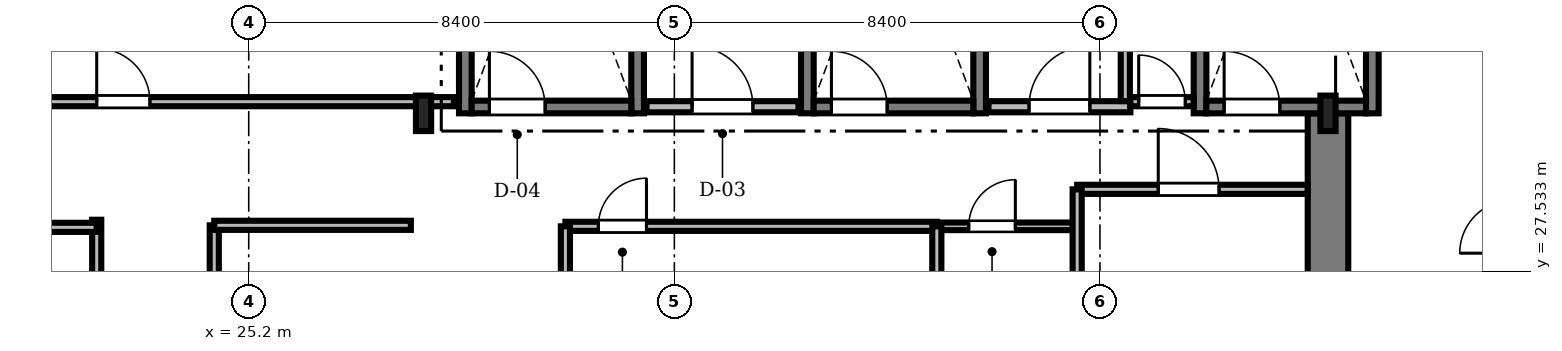
"""IFC4 building model, lengths in metres.
Left out: names, types, materials, properties, quantities, classifications, styles, units other than length and angle.
Written with IfcOpenShell. Run it as: python <this file> out.ifc"""

import sys

from ifc_helpers import new_model, si_unit, direction, frame, frame_2d, origin, origin_2d, place, context, subcontext, project, spatial, rectangle, i_section, extrude, source, transform, mapped, element, fill, save


model = new_model("IFC4")
c1 = context("Model", 3, precision=1e-05, world=origin(), true_north=direction((0.0, 1.0)))
c2 = subcontext(c1, "Body", "Model", "MODEL_VIEW")
j1 = project(units=[si_unit("LENGTHUNIT", "METRE"), si_unit("PLANEANGLEUNIT", "RADIAN")], contexts=[c1])
p1 = place(None, origin())
s1 = spatial("IfcSite", under=j1, at=p1, CompositionType="ELEMENT")
p2 = place(p1, origin())
s2 = spatial("IfcBuilding", under=s1, at=p2, CompositionType="ELEMENT")
p3 = place(p2, frame((0.0, 0.0, 188.55)))
s3 = spatial("IfcBuildingStorey", under=s2, at=p3, CompositionType="ELEMENT", Elevation=188.55)
m1 = source(origin(), c2, "Body", "SweptSolid", [
    extrude(rectangle(XDim=13.15, YDim=0.8, at=frame_2d((6.575, 0.0))), origin(), (0.0, 0.0, 1.0), 3.53),
])
p4 = place(p3, frame((46.5, 17.5, 0.0), z_axis=(0.0, 0.0, 1.0), x_axis=(0.0, 1.0, 0.0)))
e1 = element("IfcWall", 1, at=p4, inside=s3, PredefinedType="SHEAR", context=c2, shape_type="MappedRepresentation", body=[
    mapped(m1, transform((0.0, 0.0, 0.0), scale=1.0)),
])
m2 = source(origin(), c2, "Body", "SweptSolid", [
    extrude(i_section(OverallWidth=0.3, OverallDepth=0.7, WebThickness=0.017, FlangeThickness=0.032, FilletRadius=0.027, at=origin_2d()), origin(), (0.0, 0.0, 1.0), 3.53),
])
for number, where, z_axis, x_axis in (
    (2, (28.65, 30.65, 0.0), (0.0, 0.0, 1.0), (1.0, 0.0, 0.0)),
    (3, (46.5, 30.65, 0.0), (0.0, 0.0, 1.0), (1.0, 0.0, 0.0)),
):
    element("IfcColumn", number, at=place(p3, frame(where, z_axis=z_axis, x_axis=x_axis)), inside=s3, PredefinedType="COLUMN", context=c2, shape_type="MappedRepresentation", body=[
        mapped(m2, transform((0.0, 0.0, 0.0), scale=1.0)),
    ])
m3 = source(origin(), c2, "Body", "SweptSolid", [
    extrude(rectangle(XDim=9.25, YDim=0.25, at=frame_2d((4.625, 0.0))), origin(), (0.0, 0.0, 1.0), 3.55),
])
for number, where, z_axis, x_axis in (
    (4, (29.475, 30.65, 0.0), (0.0, 0.0, 1.0), (0.0, 1.0, 0.0)),
    (5, (32.875, 30.65, 0.0), (0.0, 0.0, 1.0), (0.0, 1.0, 0.0)),
):
    element("IfcWall", number, at=place(p3, frame(where, z_axis=z_axis, x_axis=x_axis)), inside=s3, PredefinedType="SOLIDWALL", context=c2, shape_type="MappedRepresentation", body=[
        mapped(m3, transform((0.0, 0.0, 0.0), scale=1.0)),
    ])
m4 = source(origin(), c2, "Body", "SweptSolid", [
    extrude(rectangle(XDim=3.15, YDim=0.25, at=frame_2d((1.575, 0.0))), origin(), (0.0, 0.0, 1.0), 3.55),
])
p5 = place(p3, frame((29.6, 30.775, 0.0), z_axis=(0.0, 0.0, 1.0), x_axis=(1.0, 0.0, 0.0)))
e6 = element("IfcWall", 6, at=p5, inside=s3, PredefinedType="SOLIDWALL", context=c2, shape_type="MappedRepresentation", body=[
    mapped(m4, transform((0.0, 0.0, 0.0), scale=1.0)),
])
m5 = source(origin(), c2, "Body", "SweptSolid", [
    extrude(rectangle(XDim=1.1, YDim=2.2, at=frame_2d((0.55, 1.1))), frame((0.0, 0.135, 0.0), z_axis=(0.0, -1.0, 0.0), x_axis=(1.0, 0.0, 0.0)), (0.0, 0.0, 1.0), 0.27),
])
p6 = place(p5, frame((0.35, 0.0, 0.0)))
e7 = element("IfcOpeningElement", 7, at=p6, cuts=e6, PredefinedType="OPENING", context=c2, shape_type="MappedRepresentation", body=[
    mapped(m5, transform((0.0, 0.0, 0.0), scale=1.0)),
])
for number, where, z_axis, x_axis in (
    (8, (36.225, 30.65, 0.0), (0.0, 0.0, 1.0), (0.0, 1.0, 0.0)),
    (9, (39.625, 30.65, 0.0), (0.0, 0.0, 1.0), (0.0, 1.0, 0.0)),
):
    element("IfcWall", number, at=place(p3, frame(where, z_axis=z_axis, x_axis=x_axis)), inside=s3, PredefinedType="SOLIDWALL", context=c2, shape_type="MappedRepresentation", body=[
        mapped(m3, transform((0.0, 0.0, 0.0), scale=1.0)),
    ])
p7 = place(p3, frame((36.35, 30.775, 0.0), z_axis=(0.0, 0.0, 1.0), x_axis=(1.0, 0.0, 0.0)))
e10 = element("IfcWall", 10, at=p7, inside=s3, PredefinedType="SOLIDWALL", context=c2, shape_type="MappedRepresentation", body=[
    mapped(m4, transform((0.0, 0.0, 0.0), scale=1.0)),
])
p8 = place(p7, frame((0.35, 0.0, 0.0)))
e11 = element("IfcOpeningElement", 11, at=p8, cuts=e10, PredefinedType="OPENING", context=c2, shape_type="MappedRepresentation", body=[
    mapped(m5, transform((0.0, 0.0, 0.0), scale=1.0)),
])
for number, where, z_axis, x_axis in (
    (12, (43.975, 30.65, 0.0), (0.0, 0.0, 1.0), (0.0, 1.0, 0.0)),
    (13, (47.375, 30.65, 0.0), (0.0, 0.0, 1.0), (0.0, 1.0, 0.0)),
):
    element("IfcWall", number, at=place(p3, frame(where, z_axis=z_axis, x_axis=x_axis)), inside=s3, PredefinedType="SOLIDWALL", context=c2, shape_type="MappedRepresentation", body=[
        mapped(m3, transform((0.0, 0.0, 0.0), scale=1.0)),
    ])
p9 = place(p3, frame((44.1, 30.775, 0.0), z_axis=(0.0, 0.0, 1.0), x_axis=(1.0, 0.0, 0.0)))
e14 = element("IfcWall", 14, at=p9, inside=s3, PredefinedType="SOLIDWALL", context=c2, shape_type="MappedRepresentation", body=[
    mapped(m4, transform((0.0, 0.0, 0.0), scale=1.0)),
])
p10 = place(p9, frame((0.35, 0.0, 0.0)))
e15 = element("IfcOpeningElement", 15, at=p10, cuts=e14, PredefinedType="OPENING", context=c2, shape_type="MappedRepresentation", body=[
    mapped(m5, transform((0.0, 0.0, 0.0), scale=1.0)),
])
m6 = source(origin(), c2, "Body", "SweptSolid", [
    extrude(rectangle(XDim=3.0, YDim=0.22, at=frame_2d((1.5, 0.0))), origin(), (0.0, 0.0, 1.0), 3.53),
])
p11 = place(p3, frame((33.05, 30.78, 0.0), z_axis=(0.0, 0.0, 1.0), x_axis=(1.0, 0.0, 0.0)))
e16 = element("IfcWall", 16, at=p11, inside=s3, PredefinedType="SOLIDWALL", context=c2, shape_type="MappedRepresentation", body=[
    mapped(m6, transform((0.0, 0.0, 0.0), scale=1.0)),
])
m7 = source(origin(), c2, "Body", "SweptSolid", [
    extrude(rectangle(XDim=1.2, YDim=2.2, at=frame_2d((0.6, 1.1))), frame((0.0, 0.12, 0.0), z_axis=(0.0, -1.0, 0.0), x_axis=(1.0, 0.0, 0.0)), (0.0, 0.0, 1.0), 0.24),
])
p12 = place(p11, frame((0.9, 0.0, 0.0)))
e17 = element("IfcOpeningElement", 17, at=p12, cuts=e16, PredefinedType="OPENING", context=c2, shape_type="MappedRepresentation", body=[
    mapped(m7, transform((0.0, 0.0, 0.0), scale=1.0)),
])
m8 = source(origin(), c2, "Body", "SweptSolid", [
    extrude(rectangle(XDim=2.8, YDim=0.22, at=frame_2d((1.4, 0.0))), origin(), (0.0, 0.0, 1.0), 3.53),
])
p13 = place(p3, frame((39.8, 30.78, 0.0), z_axis=(0.0, 0.0, 1.0), x_axis=(1.0, 0.0, 0.0)))
e18 = element("IfcWall", 18, at=p13, inside=s3, PredefinedType="SOLIDWALL", context=c2, shape_type="MappedRepresentation", body=[
    mapped(m8, transform((0.0, 0.0, 0.0), scale=1.0)),
])
p14 = place(p13, frame((0.8, 0.0, 0.0)))
e19 = element("IfcOpeningElement", 19, at=p14, cuts=e18, PredefinedType="OPENING", context=c2, shape_type="MappedRepresentation", body=[
    mapped(m7, transform((0.0, 0.0, 0.0), scale=1.0)),
])
m9 = source(origin(), c2, "Body", "SweptSolid", [
    extrude(rectangle(XDim=17.828, YDim=0.18, at=frame_2d((8.914, 0.0))), origin(), (0.0, 0.0, 1.0), 2.772),
])
p15 = place(p3, frame((11.422, 30.88, 0.0), z_axis=(0.0, 0.0, 1.0), x_axis=(1.0, 0.0, 0.0)))
e20 = element("IfcWall", 20, at=p15, inside=s3, PredefinedType="PARTITIONING", context=c2, shape_type="MappedRepresentation", body=[
    mapped(m9, transform((0.0, 0.0, 0.0), scale=1.0)),
])
m10 = source(origin(), c2, "Body", "SweptSolid", [
    extrude(rectangle(XDim=1.05, YDim=2.2, at=frame_2d((0.525, 1.1))), frame((0.0, 0.1, 0.0), z_axis=(0.0, -1.0, 0.0), x_axis=(1.0, 0.0, 0.0)), (0.0, 0.0, 1.0), 0.2),
])
p16 = place(p15, frame((10.778, 0.0, 0.0)))
e21 = element("IfcOpeningElement", 21, at=p16, cuts=e20, PredefinedType="OPENING", context=c2, shape_type="MappedRepresentation", body=[
    mapped(m10, transform((0.0, 0.0, 0.0), scale=1.0)),
])
m11 = source(origin(), c2, "Body", "SweptSolid", [
    extrude(rectangle(XDim=11.94, YDim=0.18, at=frame_2d((5.97, 0.0))), origin(), (0.0, 0.0, 1.0), 2.972),
])
p17 = place(p3, frame((24.52, 16.5, 0.0), z_axis=(0.0, 0.0, 1.0), x_axis=(0.0, 1.0, 0.0)))
e22 = element("IfcWall", 22, at=p17, inside=s3, PredefinedType="PARTITIONING", context=c2, shape_type="MappedRepresentation", body=[
    mapped(m11, transform((0.0, 0.0, 0.0), scale=1.0)),
])
p18 = place(p17, frame((4.5, 0.0, 0.0)))
e23 = element("IfcOpeningElement", 23, at=p18, cuts=e22, PredefinedType="OPENING", context=c2, shape_type="MappedRepresentation", body=[
    mapped(m10, transform((0.0, 0.0, 0.0), scale=1.0)),
])
m12 = source(origin(), c2, "Body", "SweptSolid", [
    extrude(rectangle(XDim=7.33, YDim=0.18, at=frame_2d((3.665, 0.0))), origin(), (0.0, 0.0, 1.0), 3.162),
])
p19 = place(p3, frame((31.45, 28.42, 0.0), z_axis=(0.0, 0.0, 1.0), x_axis=(1.0, 0.0, 0.0)))
e24 = element("IfcWall", 24, at=p19, inside=s3, PredefinedType="PARTITIONING", context=c2, shape_type="MappedRepresentation", body=[
    mapped(m12, transform((0.0, 0.0, 0.0), scale=1.0)),
])
m13 = source(origin(), c2, "Body", "SweptSolid", [
    extrude(rectangle(XDim=0.95, YDim=2.15, at=frame_2d((0.475, 1.075))), frame((0.0, 0.1, 0.0), z_axis=(0.0, -1.0, 0.0), x_axis=(1.0, 0.0, 0.0)), (0.0, 0.0, 1.0), 0.2),
])
p20 = place(p19, frame((0.65, 0.0, 0.0)))
e25 = element("IfcOpeningElement", 25, at=p20, cuts=e24, PredefinedType="OPENING", context=c2, shape_type="MappedRepresentation", body=[
    mapped(m13, transform((0.0, 0.0, 0.0), scale=1.0)),
])
m14 = source(origin(), c2, "Body", "SweptSolid", [
    extrude(rectangle(XDim=4.548, YDim=0.18, at=frame_2d((2.274, 0.0))), origin(), (0.0, 0.0, 1.0), 3.162),
])
p21 = place(p3, frame((41.55, 29.15, 0.0), z_axis=(0.0, 0.0, 1.0), x_axis=(1.0, 0.0, 0.0)))
e26 = element("IfcWall", 26, at=p21, inside=s3, PredefinedType="PARTITIONING", context=c2, shape_type="MappedRepresentation", body=[
    mapped(m14, transform((0.0, 0.0, 0.0), scale=1.0)),
])
m15 = source(origin(), c2, "Body", "SweptSolid", [
    extrude(rectangle(XDim=1.2, YDim=2.2, at=frame_2d((0.6, 1.1))), frame((0.0, 0.1, 0.0), z_axis=(0.0, -1.0, 0.0), x_axis=(1.0, 0.0, 0.0)), (0.0, 0.0, 1.0), 0.2),
])
p22 = place(p21, frame((1.6, 0.0, 0.0)))
e27 = element("IfcOpeningElement", 27, at=p22, cuts=e26, PredefinedType="OPENING", context=c2, shape_type="MappedRepresentation", body=[
    mapped(m15, transform((0.0, 0.0, 0.0), scale=1.0)),
])
m16 = source(origin(), c2, "Body", "SweptSolid", [
    extrude(rectangle(XDim=2.74, YDim=0.15, at=frame_2d((1.37, 0.0))), origin(), (0.0, 0.0, 1.0), 3.53),
])
p23 = place(p3, frame((38.78, 28.42, 0.0), z_axis=(0.0, 0.0, 1.0), x_axis=(1.0, 0.0, 0.0)))
e28 = element("IfcWall", 28, at=p23, inside=s3, PredefinedType="PARTITIONING", context=c2, shape_type="MappedRepresentation", body=[
    mapped(m16, transform((0.0, 0.0, 0.0), scale=1.0)),
])
m17 = source(origin(), c2, "Body", "SweptSolid", [
    extrude(rectangle(XDim=0.92, YDim=2.1, at=frame_2d((0.46, 1.05))), frame((0.0, 0.085, 0.0), z_axis=(0.0, -1.0, 0.0), x_axis=(1.0, 0.0, 0.0)), (0.0, 0.0, 1.0), 0.17),
])
p24 = place(p23, frame((0.63, 0.0, 0.0)))
e29 = element("IfcOpeningElement", 29, at=p24, cuts=e28, PredefinedType="OPENING", context=c2, shape_type="MappedRepresentation", body=[
    mapped(m17, transform((0.0, 0.0, 0.0), scale=1.0)),
])
m18 = source(origin(), c2, "Body", "SweptSolid", [
    extrude(rectangle(XDim=1.248, YDim=0.18, at=frame_2d((0.624, 0.0))), origin(), (0.0, 0.0, 1.0), 3.53),
])
p25 = place(p3, frame((42.6, 30.88, 0.0), z_axis=(0.0, 0.0, 1.0), x_axis=(1.0, 0.0, 0.0)))
e30 = element("IfcWall", 30, at=p25, inside=s3, PredefinedType="PARTITIONING", context=c2, shape_type="MappedRepresentation", body=[
    mapped(m18, transform((0.0, 0.0, 0.0), scale=1.0)),
])
m19 = source(origin(), c2, "Body", "SweptSolid", [
    extrude(rectangle(XDim=0.92, YDim=2.1, at=frame_2d((0.46, 1.05))), frame((0.0, 0.1, 0.0), z_axis=(0.0, -1.0, 0.0), x_axis=(1.0, 0.0, 0.0)), (0.0, 0.0, 1.0), 0.2),
])
p26 = place(p25, frame((0.164, 0.0, 0.0)))
e31 = element("IfcOpeningElement", 31, at=p26, cuts=e30, PredefinedType="OPENING", context=c2, shape_type="MappedRepresentation", body=[
    mapped(m19, transform((0.0, 0.0, 0.0), scale=1.0)),
])
m20 = source(origin(), c2, "Body", "SweptSolid", [
    extrude(rectangle(XDim=14.98, YDim=0.18, at=frame_2d((7.49, 0.0))), origin(), (0.0, 0.0, 1.0), 2.972),
])
p27 = place(p3, frame((22.2, 13.57, 0.0), z_axis=(0.0, 0.0, 1.0), x_axis=(0.0, 1.0, 0.0)))
e32 = element("IfcWall", 32, at=p27, inside=s3, PredefinedType="PARTITIONING", context=c2, shape_type="MappedRepresentation", body=[
    mapped(m20, transform((0.0, 0.0, 0.0), scale=1.0)),
])
m21 = source(origin(), c2, "Body", "SweptSolid", [
    extrude(rectangle(XDim=10.97, YDim=0.18, at=frame_2d((5.485, 0.0))), origin(), (0.0, 0.0, 1.0), 2.772),
])
p28 = place(p3, frame((11.23, 28.4, 0.0), z_axis=(0.0, 0.0, 1.0), x_axis=(1.0, 0.0, 0.0)))
e33 = element("IfcWall", 33, at=p28, inside=s3, PredefinedType="PARTITIONING", context=c2, shape_type="MappedRepresentation", body=[
    mapped(m21, transform((0.0, 0.0, 0.0), scale=1.0)),
])
m22 = source(origin(), c2, "Body", "SweptSolid", [
    extrude(rectangle(XDim=3.88, YDim=0.18, at=frame_2d((1.94, 0.0))), origin(), (0.0, 0.0, 1.0), 3.53),
])
p29 = place(p3, frame((24.52, 28.44, 0.0), z_axis=(0.0, 0.0, 1.0), x_axis=(1.0, 0.0, 0.0)))
e34 = element("IfcWall", 34, at=p29, inside=s3, PredefinedType="PARTITIONING", context=c2, shape_type="MappedRepresentation", body=[
    mapped(m22, transform((0.0, 0.0, 0.0), scale=1.0)),
])
m23 = source(origin(), c2, "Body", "SweptSolid", [
    extrude(rectangle(XDim=2.758, YDim=0.18, at=frame_2d((1.379, 0.0))), origin(), (0.0, 0.0, 1.0), 3.53),
])
p30 = place(p3, frame((42.5, 30.892, 0.0), z_axis=(0.0, 0.0, 1.0), x_axis=(0.0, 1.0, 0.0)))
e35 = element("IfcWall", 35, at=p30, inside=s3, PredefinedType="PARTITIONING", context=c2, shape_type="MappedRepresentation", body=[
    mapped(m23, transform((0.0, 0.0, 0.0), scale=1.0)),
])
m24 = source(origin(), c2, "Body", "SweptSolid", [
    extrude(rectangle(XDim=2.35, YDim=0.18, at=frame_2d((1.175, 0.0))), origin(), (0.0, 0.0, 1.0), 2.972),
])
p31 = place(p3, frame((41.55, 26.8, 0.0), z_axis=(0.0, 0.0, 1.0), x_axis=(0.0, 1.0, 0.0)))
e36 = element("IfcWall", 36, at=p31, inside=s3, PredefinedType="PARTITIONING", context=c2, shape_type="MappedRepresentation", body=[
    mapped(m24, transform((0.0, 0.0, 0.0), scale=1.0)),
])
m25 = source(origin(), c2, "Body", "SweptSolid", [
    extrude(rectangle(XDim=1.6, YDim=0.18, at=frame_2d((0.8, 0.0))), origin(), (0.0, 0.0, 1.0), 3.072),
])
for number, where, z_axis, x_axis in (
    (37, (31.45, 26.82, 0.0), (0.0, 0.0, 1.0), (0.0, 1.0, 0.0)),
    (38, (38.78, 26.82, 0.0), (0.0, 0.0, 1.0), (0.0, 1.0, 0.0)),
):
    element("IfcWall", number, at=place(p3, frame(where, z_axis=z_axis, x_axis=x_axis)), inside=s3, PredefinedType="PARTITIONING", context=c2, shape_type="MappedRepresentation", body=[
        mapped(m25, transform((0.0, 0.0, 0.0), scale=1.0)),
    ])
m26 = source(origin(), c2, "Body", "SweptSolid", [
    extrude(rectangle(XDim=1.1, YDim=2.2, at=frame_2d((0.55, 1.1))), frame((0.0, 0.025, 0.0), z_axis=(0.0, -1.0, 0.0), x_axis=(1.0, 0.0, 0.0)), (0.0, 0.0, 1.0), 0.05),
])
p32 = place(p6, origin())
e39 = element("IfcDoor", 39, at=p32, inside=s3, OperationType="SINGLE_SWING_LEFT", PredefinedType="DOOR", context=c2, shape_type="MappedRepresentation", body=[
    mapped(m26, transform((0.0, 0.0, 0.0), scale=1.0)),
])
fill(e7, e39)
p33 = place(p8, origin())
e40 = element("IfcDoor", 40, at=p33, inside=s3, OperationType="SINGLE_SWING_LEFT", PredefinedType="DOOR", context=c2, shape_type="MappedRepresentation", body=[
    mapped(m26, transform((0.0, 0.0, 0.0), scale=1.0)),
])
fill(e11, e40)
p34 = place(p10, origin())
e41 = element("IfcDoor", 41, at=p34, inside=s3, OperationType="SINGLE_SWING_LEFT", PredefinedType="DOOR", context=c2, shape_type="MappedRepresentation", body=[
    mapped(m26, transform((0.0, 0.0, 0.0), scale=1.0)),
])
fill(e15, e41)
m27 = source(origin(), c2, "Body", "SweptSolid", [
    extrude(rectangle(XDim=1.2, YDim=2.2, at=frame_2d((0.6, 1.1))), frame((0.0, 0.025, 0.0), z_axis=(0.0, -1.0, 0.0), x_axis=(1.0, 0.0, 0.0)), (0.0, 0.0, 1.0), 0.05),
])
p35 = place(p12, origin())
e42 = element("IfcDoor", 42, at=p35, inside=s3, OperationType="SINGLE_SWING_LEFT", PredefinedType="DOOR", context=c2, shape_type="MappedRepresentation", body=[
    mapped(m27, transform((0.0, 0.0, 0.0), scale=1.0)),
])
fill(e17, e42)
p36 = place(p14, origin())
e43 = element("IfcDoor", 43, at=p36, inside=s3, OperationType="SINGLE_SWING_RIGHT", PredefinedType="DOOR", context=c2, shape_type="MappedRepresentation", body=[
    mapped(m27, transform((0.0, 0.0, 0.0), scale=1.0)),
])
fill(e19, e43)
m28 = source(origin(), c2, "Body", "SweptSolid", [
    extrude(rectangle(XDim=1.05, YDim=2.2, at=frame_2d((0.525, 1.1))), frame((0.0, 0.025, 0.0), z_axis=(0.0, -1.0, 0.0), x_axis=(1.0, 0.0, 0.0)), (0.0, 0.0, 1.0), 0.05),
])
p37 = place(p16, origin())
e44 = element("IfcDoor", 44, at=p37, inside=s3, OperationType="SINGLE_SWING_LEFT", PredefinedType="DOOR", context=c2, shape_type="MappedRepresentation", body=[
    mapped(m28, transform((0.0, 0.0, 0.0), scale=1.0)),
])
fill(e21, e44)
m29 = source(origin(), c2, "Body", "SweptSolid", [
    extrude(rectangle(XDim=0.95, YDim=2.15, at=frame_2d((0.475, 1.075))), frame((0.0, 0.025, 0.0), z_axis=(0.0, -1.0, 0.0), x_axis=(1.0, 0.0, 0.0)), (0.0, 0.0, 1.0), 0.05),
])
p38 = place(p20, origin())
e45 = element("IfcDoor", 45, at=p38, inside=s3, OperationType="SINGLE_SWING_RIGHT", PredefinedType="DOOR", context=c2, shape_type="MappedRepresentation", body=[
    mapped(m29, transform((0.0, 0.0, 0.0), scale=1.0)),
])
fill(e25, e45)
p39 = place(p22, origin())
e46 = element("IfcDoor", 46, at=p39, inside=s3, OperationType="SINGLE_SWING_LEFT", PredefinedType="DOOR", context=c2, shape_type="MappedRepresentation", body=[
    mapped(m27, transform((0.0, 0.0, 0.0), scale=1.0)),
])
fill(e27, e46)
m30 = source(origin(), c2, "Body", "SweptSolid", [
    extrude(rectangle(XDim=0.92, YDim=2.1, at=frame_2d((0.46, 1.05))), frame((0.0, 0.025, 0.0), z_axis=(0.0, -1.0, 0.0), x_axis=(1.0, 0.0, 0.0)), (0.0, 0.0, 1.0), 0.05),
])
p40 = place(p24, origin())
e47 = element("IfcDoor", 47, at=p40, inside=s3, OperationType="SINGLE_SWING_RIGHT", PredefinedType="DOOR", context=c2, shape_type="MappedRepresentation", body=[
    mapped(m30, transform((0.0, 0.0, 0.0), scale=1.0)),
])
fill(e29, e47)
p41 = place(p26, origin())
e48 = element("IfcDoor", 48, at=p41, inside=s3, OperationType="SINGLE_SWING_LEFT", PredefinedType="DOOR", context=c2, shape_type="MappedRepresentation", body=[
    mapped(m30, transform((0.0, 0.0, 0.0), scale=1.0)),
])
fill(e31, e48)
save(model, sys.argv[1])
